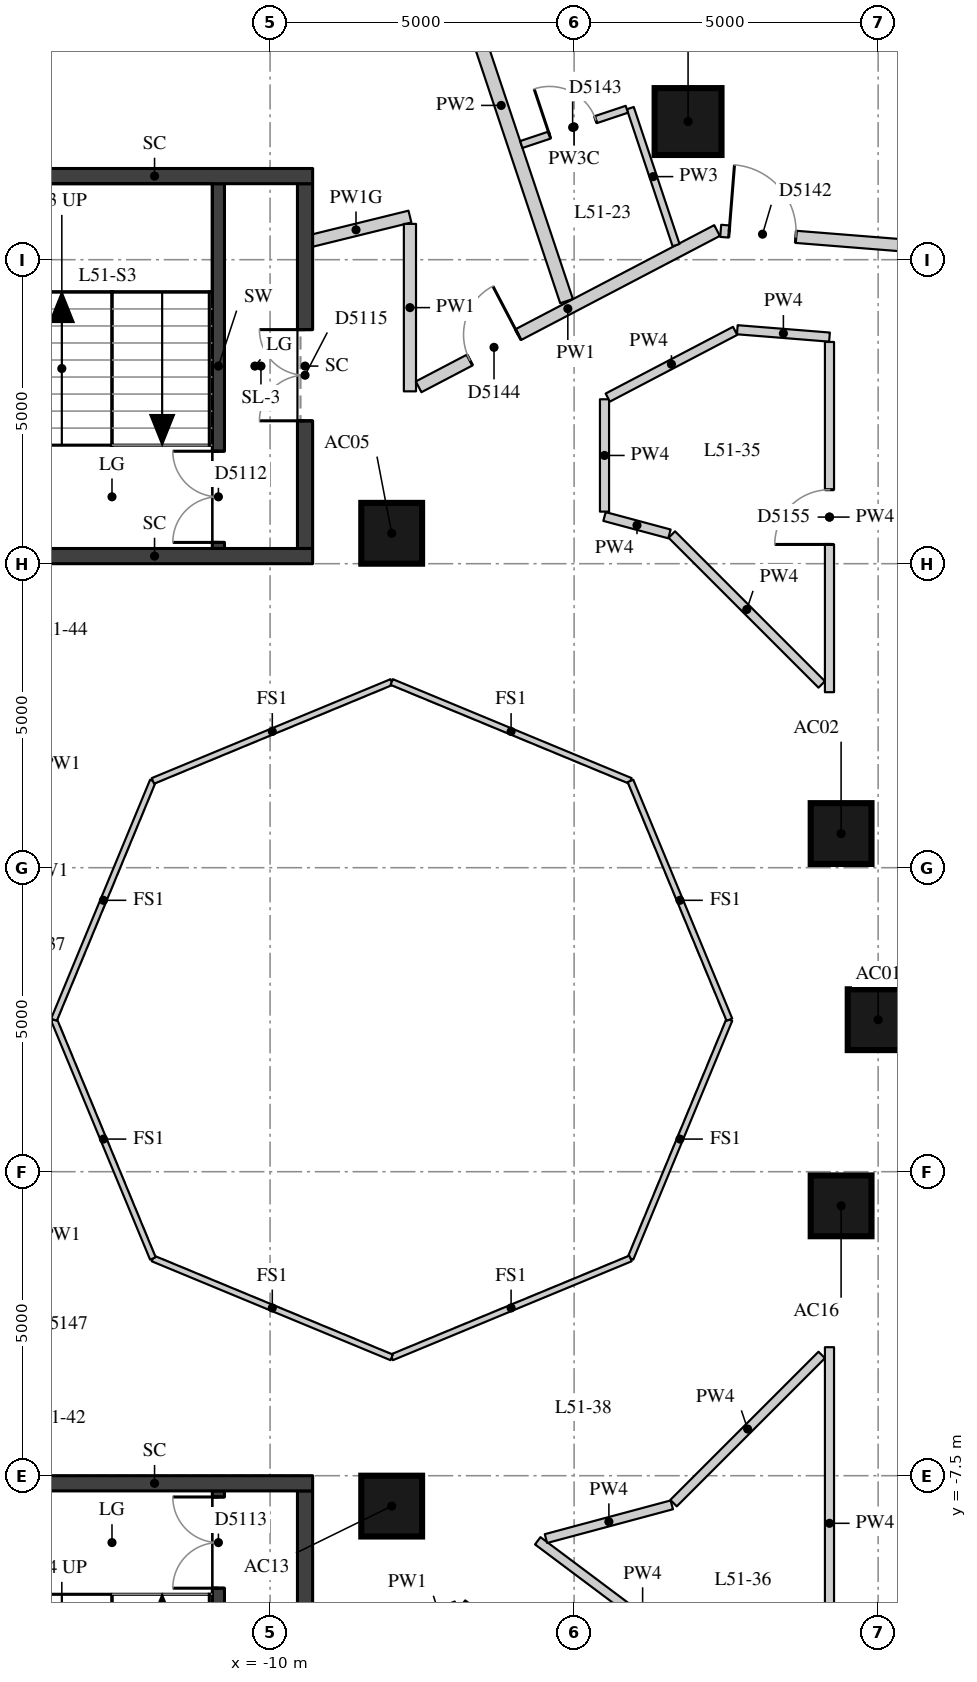
"""IFC4 building model, lengths in metres.
Left out: names, types, materials, properties, quantities, classifications, styles, units other than length and angle.
Written with IfcOpenShell. Run it as: python <this file> out.ifc"""

import sys

from ifc_helpers import new_model, si_unit, direction, frame, frame_2d, origin, origin_2d, place, context, subcontext, project, spatial, rectangle, extrude, element, fill, save


model = new_model("IFC4")
c1 = context("Model", 3, precision=1e-05, world=origin(), true_north=direction((0.0, 1.0)))
c2 = subcontext(c1, "Body", "Model", "MODEL_VIEW")
j1 = project(units=[si_unit("LENGTHUNIT", "METRE"), si_unit("PLANEANGLEUNIT", "RADIAN")], contexts=[c1])
p1 = place(None, origin())
s1 = spatial("IfcSite", under=j1, at=p1, CompositionType="ELEMENT")
p2 = place(p1, origin())
s2 = spatial("IfcBuilding", under=s1, at=p2, CompositionType="ELEMENT")
p3 = place(p2, frame((0.0, 0.0, 181.4)))
s3 = spatial("IfcBuildingStorey", under=s2, at=p3, CompositionType="ELEMENT", Elevation=181.4)
for number, where, z_axis, x_axis in (
    (1, (0.0, 0.0, 0.0), (0.0, 0.0, 1.0), (1.0, 0.0, 0.0)),
    (2, (-0.609, 3.062, 0.0), (0.0, 0.0, 1.0), (1.0, 0.0, 0.0)),
    (3, (-8.0, 8.0, 0.0), (0.0, 0.0, 1.0), (1.0, 0.0, 0.0)),
    (4, (-8.0, -8.0, 0.0), (0.0, 0.0, 1.0), (1.0, 0.0, 0.0)),
    (5, (-0.609, -3.062, 0.0), (0.0, 0.0, 1.0), (1.0, 0.0, 0.0)),
):
    element("IfcColumn", number, at=place(p3, frame(where, z_axis=z_axis, x_axis=x_axis)), inside=s3, PredefinedType="COLUMN", context=c2, shape_type="SweptSolid", body=[
        extrude(rectangle(XDim=1.0, YDim=1.0, at=origin_2d()), origin(), (0.0, 0.0, 1.0), 3.3),
    ])
p4 = place(p3, frame((-3.126, 14.772, 0.0), z_axis=(0.0, 0.0, 1.0), x_axis=(1.0, 0.0, 0.0)))
e6 = element("IfcColumn", 6, at=p4, inside=s3, PredefinedType="COLUMN", context=c2, shape_type="SweptSolid", body=[
    extrude(rectangle(XDim=1.1, YDim=1.1, at=origin_2d()), origin(), (0.0, 0.0, 1.0), 3.3),
])
p5 = place(p3, frame((-10.85, 7.75, 0.0), z_axis=(0.0, 0.0, 1.0), x_axis=(0.0, 1.0, 0.0)))
e7 = element("IfcWall", 7, at=p5, inside=s3, PredefinedType="SHEAR", context=c2, shape_type="SweptSolid", body=[
    extrude(rectangle(XDim=6.0, YDim=0.2, at=frame_2d((3.0, 0.0))), origin(), (0.0, 0.0, 1.0), 2.85),
])
p6 = place(p5, frame((0.1, 0.0, 0.0)))
e8 = element("IfcOpeningElement", 8, at=p6, cuts=e7, PredefinedType="OPENING", context=c2, shape_type="SweptSolid", body=[
    extrude(rectangle(XDim=1.5, YDim=2.1, at=frame_2d((0.75, 1.05))), frame((0.0, 0.11, 0.0), z_axis=(0.0, -1.0, 0.0), x_axis=(1.0, 0.0, 0.0)), (0.0, 0.0, 1.0), 0.22),
])
p7 = place(p3, frame((-10.85, -13.75, 0.0), z_axis=(0.0, 0.0, 1.0), x_axis=(0.0, 1.0, 0.0)))
e9 = element("IfcWall", 9, at=p7, inside=s3, PredefinedType="SHEAR", context=c2, shape_type="SweptSolid", body=[
    extrude(rectangle(XDim=6.0, YDim=0.2, at=frame_2d((3.0, 0.0))), origin(), (0.0, 0.0, 1.0), 2.85),
])
p8 = place(p7, frame((4.4, 0.0, 0.0)))
e10 = element("IfcOpeningElement", 10, at=p8, cuts=e9, PredefinedType="OPENING", context=c2, shape_type="SweptSolid", body=[
    extrude(rectangle(XDim=1.5, YDim=2.1, at=frame_2d((0.75, 1.05))), frame((0.0, 0.11, 0.0), z_axis=(0.0, -1.0, 0.0), x_axis=(1.0, 0.0, 0.0)), (0.0, 0.0, 1.0), 0.22),
])
p9 = place(p3, frame((-9.425, 7.75, -0.28), z_axis=(0.0, 0.0, 1.0), x_axis=(0.0, 1.0, 0.0)))
e11 = element("IfcWall", 11, at=p9, inside=s3, PredefinedType="SHEAR", context=c2, shape_type="SweptSolid", body=[
    extrude(rectangle(XDim=6.0, YDim=0.25, at=frame_2d((3.0, 0.0))), origin(), (0.0, 0.0, 1.0), 3.13),
])
p10 = place(p9, frame((2.1, 0.0, 0.28)))
e12 = element("IfcOpeningElement", 12, at=p10, cuts=e11, PredefinedType="OPENING", context=c2, shape_type="SweptSolid", body=[
    extrude(rectangle(XDim=1.5, YDim=2.1, at=frame_2d((0.75, 1.05))), frame((0.0, 0.135, 0.0), z_axis=(0.0, -1.0, 0.0), x_axis=(1.0, 0.0, 0.0)), (0.0, 0.0, 1.0), 0.27),
])
for number, where, z_axis, x_axis in (
    (13, (-14.5, 13.875, -0.28), (0.0, 0.0, 1.0), (1.0, 0.0, 0.0)),
    (14, (-14.5, 7.625, -0.28), (0.0, 0.0, 1.0), (1.0, 0.0, 0.0)),
):
    element("IfcWall", number, at=place(p3, frame(where, z_axis=z_axis, x_axis=x_axis)), inside=s3, PredefinedType="SHEAR", context=c2, shape_type="SweptSolid", body=[
        extrude(rectangle(XDim=5.2, YDim=0.25, at=frame_2d((2.6, 0.0))), origin(), (0.0, 0.0, 1.0), 3.13),
    ])
p11 = place(p3, frame((-9.425, -13.75, -0.28), z_axis=(0.0, 0.0, 1.0), x_axis=(0.0, 1.0, 0.0)))
e15 = element("IfcWall", 15, at=p11, inside=s3, PredefinedType="SHEAR", context=c2, shape_type="SweptSolid", body=[
    extrude(rectangle(XDim=6.0, YDim=0.25, at=frame_2d((3.0, 0.0))), origin(), (0.0, 0.0, 1.0), 3.13),
])
p12 = place(p11, frame((2.4, 0.0, 0.28)))
e16 = element("IfcOpeningElement", 16, at=p12, cuts=e15, PredefinedType="OPENING", context=c2, shape_type="SweptSolid", body=[
    extrude(rectangle(XDim=1.5, YDim=2.1, at=frame_2d((0.75, 1.05))), frame((0.0, 0.135, 0.0), z_axis=(0.0, -1.0, 0.0), x_axis=(1.0, 0.0, 0.0)), (0.0, 0.0, 1.0), 0.27),
])
p13 = place(p3, frame((-14.5, -7.625, -0.28), z_axis=(0.0, 0.0, 1.0), x_axis=(1.0, 0.0, 0.0)))
e17 = element("IfcWall", 17, at=p13, inside=s3, PredefinedType="SHEAR", context=c2, shape_type="SweptSolid", body=[
    extrude(rectangle(XDim=5.2, YDim=0.25, at=frame_2d((2.6, 0.0))), origin(), (0.0, 0.0, 1.0), 3.13),
])
p14 = place(p3, frame((-9.474, 12.773, 0.0), z_axis=(0.0, 0.0, 1.0), x_axis=(0.971086426401, 0.238728197874, 0.0)))
e18 = element("IfcWall", 18, at=p14, inside=s3, PredefinedType="PARTITIONING", context=c2, shape_type="SweptSolid", body=[
    extrude(rectangle(XDim=1.826, YDim=0.2, at=frame_2d((0.913, 0.0))), origin(), (0.0, 0.0, 1.0), 2.4),
])
p15 = place(p3, frame((-7.7, 13.089, 0.0), z_axis=(0.0, 0.0, 1.0), x_axis=(0.0, -1.0, 0.0)))
e19 = element("IfcWall", 19, at=p15, inside=s3, PredefinedType="PARTITIONING", context=c2, shape_type="SweptSolid", body=[
    extrude(rectangle(XDim=2.754, YDim=0.2, at=frame_2d((1.377, 0.0))), origin(), (0.0, 0.0, 1.0), 2.85),
])
p16 = place(p3, frame((-7.557, 10.409, 0.0), z_axis=(0.0, 0.0, 1.0), x_axis=(0.885861719566, 0.463949365565, 0.0)))
e20 = element("IfcWall", 20, at=p16, inside=s3, PredefinedType="PARTITIONING", context=c2, shape_type="SweptSolid", body=[
    extrude(rectangle(XDim=5.541, YDim=0.2, at=frame_2d((2.77, 0.0))), origin(), (0.0, 0.0, 1.0), 2.85),
])
p17 = place(p16, frame((0.95, 0.0, 0.0)))
e21 = element("IfcOpeningElement", 21, at=p17, cuts=e20, PredefinedType="OPENING", context=c2, shape_type="SweptSolid", body=[
    extrude(rectangle(XDim=0.9, YDim=2.1, at=frame_2d((0.45, 1.05))), frame((0.0, 0.11, 0.0), z_axis=(0.0, -1.0, 0.0), x_axis=(1.0, 0.0, 0.0)), (0.0, 0.0, 1.0), 0.22),
])
p18 = place(p3, frame((-2.589, 12.974, 0.0), z_axis=(0.0, 0.0, 1.0), x_axis=(0.996834299001, -0.079507108712, 0.0)))
e22 = element("IfcWall", 22, at=p18, inside=s3, PredefinedType="PARTITIONING", context=c2, shape_type="SweptSolid", body=[
    extrude(rectangle(XDim=8.11, YDim=0.2, at=frame_2d((4.055, 0.0))), origin(), (0.0, 0.0, 1.0), 2.85),
])
p19 = place(p18, frame((0.14, 0.0, 0.0)))
e23 = element("IfcOpeningElement", 23, at=p19, cuts=e22, PredefinedType="OPENING", context=c2, shape_type="SweptSolid", body=[
    extrude(rectangle(XDim=1.1, YDim=2.1, at=frame_2d((0.55, 1.05))), frame((0.0, 0.11, 0.0), z_axis=(0.0, -1.0, 0.0), x_axis=(1.0, 0.0, 0.0)), (0.0, 0.0, 1.0), 0.22),
])
p20 = place(p3, frame((-2.698, -12.744, 0.0), z_axis=(0.0, 0.0, 1.0), x_axis=(-0.800208812098, 0.59972148289, 0.0)))
e24 = element("IfcWall", 24, at=p20, inside=s3, PredefinedType="PARTITIONING", context=c2, shape_type="SweptSolid", body=[
    extrude(rectangle(XDim=5.19, YDim=0.2, at=frame_2d((2.595, 0.0))), origin(), (0.0, 0.0, 1.0), 2.85),
])
p21 = place(p3, frame((-6.925, -9.661, 0.0), z_axis=(0.0, 0.0, 1.0), x_axis=(-0.923725195793, -0.383055821855, 0.0)))
e25 = element("IfcWall", 25, at=p21, inside=s3, PredefinedType="PARTITIONING", context=c2, shape_type="SweptSolid", body=[
    extrude(rectangle(XDim=0.623, YDim=0.2, at=frame_2d((0.312, 0.0))), origin(), (0.0, 0.0, 1.0), 2.85),
])
p22 = place(p3, frame((-2.316, 11.348, 0.0), z_axis=(0.0, 0.0, 1.0), x_axis=(0.99682547828, -0.079617622742, 0.0)))
e26 = element("IfcWall", 26, at=p22, inside=s3, PredefinedType="PARTITIONING", context=c2, shape_type="SweptSolid", body=[
    extrude(rectangle(XDim=1.521, YDim=0.15, at=frame_2d((0.76, 0.0))), origin(), (0.0, 0.0, 1.0), 2.85),
])
p23 = place(p3, frame((-0.8, 11.147, 0.0), z_axis=(0.0, 0.0, 1.0), x_axis=(0.0, -1.0, 0.0)))
e27 = element("IfcWall", 27, at=p23, inside=s3, PredefinedType="PARTITIONING", context=c2, shape_type="SweptSolid", body=[
    extrude(rectangle(XDim=5.76, YDim=0.15, at=frame_2d((2.88, 0.0))), origin(), (0.0, 0.0, 1.0), 2.85),
])
p24 = place(p23, frame((2.43, 0.0, 0.0)))
e28 = element("IfcOpeningElement", 28, at=p24, cuts=e27, PredefinedType="OPENING", context=c2, shape_type="SweptSolid", body=[
    extrude(rectangle(XDim=0.9, YDim=2.1, at=frame_2d((0.45, 1.05))), frame((0.0, 0.085, 0.0), z_axis=(0.0, -1.0, 0.0), x_axis=(1.0, 0.0, 0.0)), (0.0, 0.0, 1.0), 0.17),
])
p25 = place(p3, frame((-0.927, 5.514, 0.0), z_axis=(0.0, 0.0, 1.0), x_axis=(-0.707106781187, 0.707106781187, 0.0)))
e29 = element("IfcWall", 29, at=p25, inside=s3, PredefinedType="PARTITIONING", context=c2, shape_type="SweptSolid", body=[
    extrude(rectangle(XDim=3.487, YDim=0.15, at=frame_2d((1.743, 0.0))), origin(), (0.0, 0.0, 1.0), 2.85),
])
p26 = place(p3, frame((-3.432, 7.99, 0.0), z_axis=(0.0, 0.0, 1.0), x_axis=(-0.965900750832, 0.258912609855, 0.0)))
e30 = element("IfcWall", 30, at=p26, inside=s3, PredefinedType="PARTITIONING", context=c2, shape_type="SweptSolid", body=[
    extrude(rectangle(XDim=1.106, YDim=0.15, at=frame_2d((0.553, 0.0))), origin(), (0.0, 0.0, 1.0), 2.85),
])
p27 = place(p3, frame((-4.5, 8.356, 0.0), z_axis=(0.0, 0.0, 1.0), x_axis=(0.0, 1.0, 0.0)))
e31 = element("IfcWall", 31, at=p27, inside=s3, PredefinedType="PARTITIONING", context=c2, shape_type="SweptSolid", body=[
    extrude(rectangle(XDim=1.848, YDim=0.15, at=frame_2d((0.924, 0.0))), origin(), (0.0, 0.0, 1.0), 2.85),
])
p28 = place(p3, frame((-4.447, 10.232, 0.0), z_axis=(0.0, 0.0, 1.0), x_axis=(0.885843659857, 0.463983847016, 0.0)))
e32 = element("IfcWall", 32, at=p28, inside=s3, PredefinedType="PARTITIONING", context=c2, shape_type="SweptSolid", body=[
    extrude(rectangle(XDim=2.365, YDim=0.15, at=frame_2d((1.182, 0.0))), origin(), (0.0, 0.0, 1.0), 2.85),
])
p29 = place(p3, frame((-0.8, -5.386, 0.0), z_axis=(0.0, 0.0, 1.0), x_axis=(0.0, -1.0, 0.0)))
e33 = element("IfcWall", 33, at=p29, inside=s3, PredefinedType="PARTITIONING", context=c2, shape_type="SweptSolid", body=[
    extrude(rectangle(XDim=5.793, YDim=0.15, at=frame_2d((2.896, 0.0))), origin(), (0.0, 0.0, 1.0), 2.85),
])
p30 = place(p3, frame((-2.148, -11.156, 0.0), z_axis=(0.0, 0.0, 1.0), x_axis=(-0.800210636755, 0.599719048241, 0.0)))
e34 = element("IfcWall", 34, at=p30, inside=s3, PredefinedType="PARTITIONING", context=c2, shape_type="SweptSolid", body=[
    extrude(rectangle(XDim=4.311, YDim=0.15, at=frame_2d((2.155, 0.0))), origin(), (0.0, 0.0, 1.0), 2.85),
])
p31 = place(p3, frame((-5.463, -8.534, 0.0), z_axis=(0.0, 0.0, 1.0), x_axis=(0.965888027346, 0.258960071498, 0.0)))
e35 = element("IfcWall", 35, at=p31, inside=s3, PredefinedType="PARTITIONING", context=c2, shape_type="SweptSolid", body=[
    extrude(rectangle(XDim=2.143, YDim=0.15, at=frame_2d((1.071, 0.0))), origin(), (0.0, 0.0, 1.0), 2.85),
])
p32 = place(p3, frame((-3.365, -7.951, 0.0), z_axis=(0.0, 0.0, 1.0), x_axis=(0.707106781187, 0.707106781187, 0.0)))
e36 = element("IfcWall", 36, at=p32, inside=s3, PredefinedType="PARTITIONING", context=c2, shape_type="SweptSolid", body=[
    extrude(rectangle(XDim=3.447, YDim=0.15, at=frame_2d((1.723, 0.0))), origin(), (0.0, 0.0, 1.0), 2.85),
])
p33 = place(p3, frame((-7.274, 18.256, 0.0), z_axis=(0.0, 0.0, 1.0), x_axis=(0.316724121691, -0.948517701859, 0.0)))
e37 = element("IfcWall", 37, at=p33, inside=s3, PredefinedType="PARTITIONING", context=c2, shape_type="SweptSolid", body=[
    extrude(rectangle(XDim=6.787, YDim=0.22, at=frame_2d((3.394, 0.0))), origin(), (0.0, 0.0, 1.0), 2.85),
])
p34 = place(p3, frame((-3.323, 12.74, 0.0), z_axis=(0.0, 0.0, 1.0), x_axis=(-0.316720994124, 0.948518746194, 0.0)))
e38 = element("IfcWall", 38, at=p34, inside=s3, PredefinedType="PARTITIONING", context=c2, shape_type="SweptSolid", body=[
    extrude(rectangle(XDim=2.376, YDim=0.12, at=frame_2d((1.188, 0.0))), origin(), (0.0, 0.0, 1.0), 2.85),
])
p35 = place(p3, frame((-4.133, 14.974, 0.0), z_axis=(0.0, 0.0, 1.0), x_axis=(-0.9485230882, -0.31670799035, 0.0)))
e39 = element("IfcWall", 39, at=p35, inside=s3, PredefinedType="PARTITIONING", context=c2, shape_type="SweptSolid", body=[
    extrude(rectangle(XDim=1.83, YDim=0.12, at=frame_2d((0.915, 0.0))), origin(), (0.0, 0.0, 1.0), 2.4),
])
p36 = place(p35, frame((0.54, 0.0, 0.0)))
e40 = element("IfcOpeningElement", 40, at=p36, cuts=e39, PredefinedType="OPENING", context=c2, shape_type="SweptSolid", body=[
    extrude(rectangle(XDim=0.8, YDim=2.1, at=frame_2d((0.4, 1.05))), frame((0.0, 0.07, 0.0), z_axis=(0.0, -1.0, 0.0), x_axis=(1.0, 0.0, 0.0)), (0.0, 0.0, 1.0), 0.14),
])
for number, where, z_axis, x_axis in (
    (41, (-2.446, 0.0, 0.0), (0.0, 0.0, 1.0), (-0.383, -0.924, 0.0)),
    (42, (-4.073, -3.927, 0.0), (0.0, 0.0, 1.0), (-0.924, -0.383, 0.0)),
    (43, (-8.0, -5.554, 0.0), (0.0, 0.0, 1.0), (-0.924, 0.383, 0.0)),
    (44, (-11.927, -3.927, 0.0), (0.0, 0.0, 1.0), (-0.383, 0.924, 0.0)),
    (45, (-13.554, 0.0, 0.0), (0.0, 0.0, 1.0), (0.383, 0.924, 0.0)),
    (46, (-11.927, 3.927, 0.0), (0.0, 0.0, 1.0), (0.924, 0.383, 0.0)),
    (47, (-8.0, 5.554, 0.0), (0.0, 0.0, 1.0), (0.924, -0.383, 0.0)),
    (48, (-4.073, 3.927, 0.0), (0.0, 0.0, 1.0), (0.383, -0.924, 0.0)),
):
    element("IfcWall", number, at=place(p3, frame(where, z_axis=z_axis, x_axis=x_axis)), inside=s3, PredefinedType="PARTITIONING", context=c2, shape_type="SweptSolid", body=[
        extrude(rectangle(XDim=4.251, YDim=0.1, at=frame_2d((2.125, 0.0))), origin(), (0.0, 0.0, 1.0), 2.85),
    ])
p37 = place(p6, origin())
e49 = element("IfcDoor", 49, at=p37, inside=s3, OperationType="DOUBLE_DOOR_SINGLE_SWING", PredefinedType="DOOR", context=c2, shape_type="SweptSolid", body=[
    extrude(rectangle(XDim=1.5, YDim=2.1, at=frame_2d((0.75, 1.05))), frame((0.0, 0.025, 0.0), z_axis=(0.0, -1.0, 0.0), x_axis=(1.0, 0.0, 0.0)), (0.0, 0.0, 1.0), 0.05),
])
fill(e8, e49)
p38 = place(p8, origin())
e50 = element("IfcDoor", 50, at=p38, inside=s3, OperationType="DOUBLE_DOOR_SINGLE_SWING", PredefinedType="DOOR", context=c2, shape_type="SweptSolid", body=[
    extrude(rectangle(XDim=1.5, YDim=2.1, at=frame_2d((0.75, 1.05))), frame((0.0, 0.025, 0.0), z_axis=(0.0, -1.0, 0.0), x_axis=(1.0, 0.0, 0.0)), (0.0, 0.0, 1.0), 0.05),
])
fill(e10, e50)
p39 = place(p10, origin())
e51 = element("IfcDoor", 51, at=p39, inside=s3, OperationType="DOUBLE_DOOR_SINGLE_SWING", PredefinedType="DOOR", context=c2, shape_type="SweptSolid", body=[
    extrude(rectangle(XDim=1.5, YDim=2.1, at=frame_2d((0.75, 1.05))), frame((0.0, 0.025, 0.0), z_axis=(0.0, -1.0, 0.0), x_axis=(1.0, 0.0, 0.0)), (0.0, 0.0, 1.0), 0.05),
])
fill(e12, e51)
p40 = place(p19, origin())
e52 = element("IfcDoor", 52, at=p40, inside=s3, OperationType="SINGLE_SWING_LEFT", PredefinedType="DOOR", context=c2, shape_type="SweptSolid", body=[
    extrude(rectangle(XDim=1.1, YDim=2.1, at=frame_2d((0.55, 1.05))), frame((0.0, 0.025, 0.0), z_axis=(0.0, -1.0, 0.0), x_axis=(1.0, 0.0, 0.0)), (0.0, 0.0, 1.0), 0.05),
])
fill(e23, e52)
p41 = place(p36, origin())
e53 = element("IfcDoor", 53, at=p41, inside=s3, OperationType="SINGLE_SWING_LEFT", PredefinedType="DOOR", context=c2, shape_type="SweptSolid", body=[
    extrude(rectangle(XDim=0.8, YDim=2.1, at=frame_2d((0.4, 1.05))), frame((0.0, 0.025, 0.0), z_axis=(0.0, -1.0, 0.0), x_axis=(1.0, 0.0, 0.0)), (0.0, 0.0, 1.0), 0.05),
])
fill(e40, e53)
p42 = place(p17, origin())
e54 = element("IfcDoor", 54, at=p42, inside=s3, OperationType="SINGLE_SWING_RIGHT", PredefinedType="DOOR", context=c2, shape_type="SweptSolid", body=[
    extrude(rectangle(XDim=0.9, YDim=2.1, at=frame_2d((0.45, 1.05))), frame((0.0, 0.025, 0.0), z_axis=(0.0, -1.0, 0.0), x_axis=(1.0, 0.0, 0.0)), (0.0, 0.0, 1.0), 0.05),
])
fill(e21, e54)
p43 = place(p24, origin())
e55 = element("IfcDoor", 55, at=p43, inside=s3, OperationType="SINGLE_SWING_LEFT", PredefinedType="DOOR", context=c2, shape_type="SweptSolid", body=[
    extrude(rectangle(XDim=0.9, YDim=2.1, at=frame_2d((0.45, 1.05))), frame((0.0, 0.025, 0.0), z_axis=(0.0, -1.0, 0.0), x_axis=(1.0, 0.0, 0.0)), (0.0, 0.0, 1.0), 0.05),
])
fill(e28, e55)
save(model, sys.argv[1])
